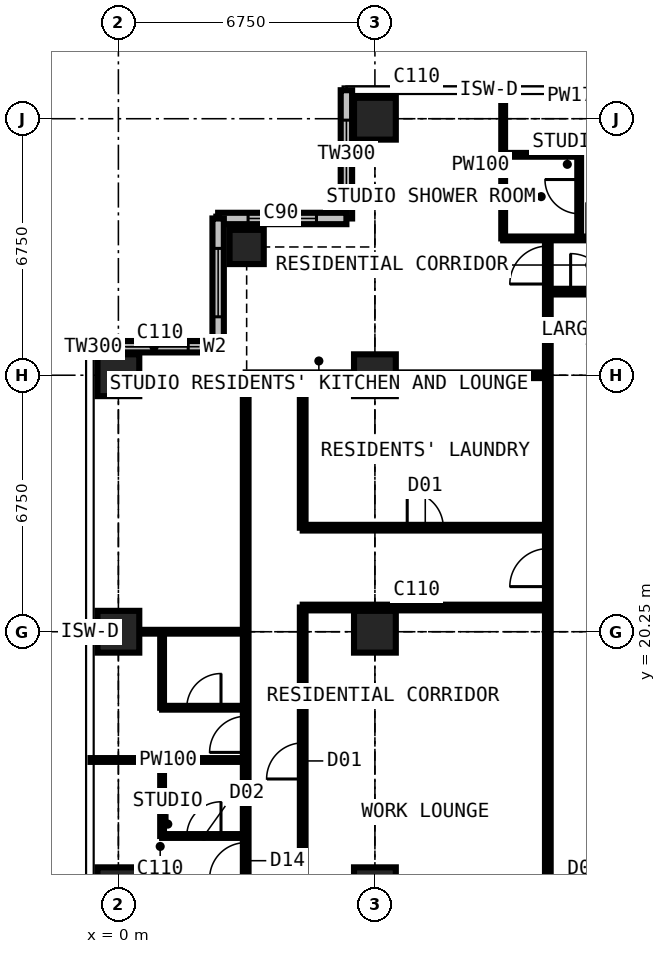
"""IFC4 building model, lengths in metres.
Left out: names, types, materials, properties, quantities, classifications, styles, units other than length and angle.
Written with IfcOpenShell. Run it as: python <this file> out.ifc"""

import sys

from ifc_helpers import new_model, si_unit, direction, frame, frame_2d, origin, origin_2d, place, context, subcontext, project, spatial, rectangle, extrude, element, fill, save


model = new_model("IFC4")
c1 = context("Model", 3, precision=1e-05, world=origin(), true_north=direction((0.0, 1.0)))
c2 = subcontext(c1, "Body", "Model", "MODEL_VIEW")
j1 = project(units=[si_unit("LENGTHUNIT", "METRE"), si_unit("PLANEANGLEUNIT", "RADIAN")], contexts=[c1])
p1 = place(None, origin())
s1 = spatial("IfcSite", under=j1, at=p1, CompositionType="ELEMENT")
p2 = place(p1, origin())
s2 = spatial("IfcBuilding", under=s1, at=p2, CompositionType="ELEMENT")
p3 = place(p2, frame((0.0, 0.0, 225.9)))
s3 = spatial("IfcBuildingStorey", under=s2, at=p3, CompositionType="ELEMENT", Elevation=225.9)
for number, where, z_axis, x_axis in (
    (1, (0.0, 13.5, 0.0), (0.0, 0.0, 1.0), (1.0, 0.0, 0.0)),
    (2, (0.0, 20.25, 0.0), (0.0, 0.0, 1.0), (1.0, 0.0, 0.0)),
    (3, (0.0, 27.0, 0.0), (0.0, 0.0, 1.0), (1.0, 0.0, 0.0)),
):
    element("IfcColumn", number, at=place(p3, frame(where, z_axis=z_axis, x_axis=x_axis)), inside=s3, PredefinedType="COLUMN", context=c2, shape_type="SweptSolid", body=[
        extrude(rectangle(XDim=1.1, YDim=1.1, at=origin_2d()), origin(), (0.0, 0.0, 1.0), 3.6),
    ])
p4 = place(p3, frame((3.375, 30.375, 0.0), z_axis=(0.0, 0.0, 1.0), x_axis=(1.0, 0.0, 0.0)))
e4 = element("IfcColumn", 4, at=p4, inside=s3, PredefinedType="COLUMN", context=c2, shape_type="SweptSolid", body=[
    extrude(rectangle(XDim=0.9, YDim=0.9, at=origin_2d()), origin(), (0.0, 0.0, 1.0), 3.6),
])
for number, where, z_axis, x_axis in (
    (5, (6.75, 13.5, 0.0), (0.0, 0.0, 1.0), (1.0, 0.0, 0.0)),
    (6, (6.75, 20.25, 0.0), (0.0, 0.0, 1.0), (1.0, 0.0, 0.0)),
    (7, (6.75, 27.0, 0.0), (0.0, 0.0, 1.0), (1.0, 0.0, 0.0)),
    (8, (6.75, 33.75, 0.0), (0.0, 0.0, 1.0), (1.0, 0.0, 0.0)),
):
    element("IfcColumn", number, at=place(p3, frame(where, z_axis=z_axis, x_axis=x_axis)), inside=s3, PredefinedType="COLUMN", context=c2, shape_type="SweptSolid", body=[
        extrude(rectangle(XDim=1.1, YDim=1.1, at=origin_2d()), origin(), (0.0, 0.0, 1.0), 3.6),
    ])
p5 = place(p3, frame((6.0, 34.5, 0.0), z_axis=(0.0, 0.0, 1.0), x_axis=(0.0, -1.0, 0.0)))
e9 = element("IfcWall", 9, at=p5, inside=s3, PredefinedType="SOLIDWALL", context=c2, shape_type="SweptSolid", body=[
    extrude(rectangle(XDim=3.375, YDim=0.3, at=frame_2d((1.688, 0.0))), origin(), (0.0, 0.0, 1.0), 3.375),
])
p6 = place(p5, frame((0.788, 0.0, 0.6)))
e10 = element("IfcOpeningElement", 10, at=p6, cuts=e9, PredefinedType="OPENING", context=c2, shape_type="SweptSolid", body=[
    extrude(rectangle(XDim=1.8, YDim=2.1, at=frame_2d((0.9, 1.05))), frame((0.0, 0.16, 0.0), z_axis=(0.0, -1.0, 0.0), x_axis=(1.0, 0.0, 0.0)), (0.0, 0.0, 1.0), 0.32),
])
p7 = place(p3, frame((6.0, 31.125, 0.0), z_axis=(0.0, 0.0, 1.0), x_axis=(-1.0, 0.0, 0.0)))
e11 = element("IfcWall", 11, at=p7, inside=s3, PredefinedType="SOLIDWALL", context=c2, shape_type="SweptSolid", body=[
    extrude(rectangle(XDim=3.375, YDim=0.3, at=frame_2d((1.688, 0.0))), origin(), (0.0, 0.0, 1.0), 3.375),
])
p8 = place(p7, frame((0.788, 0.0, 0.6)))
e12 = element("IfcOpeningElement", 12, at=p8, cuts=e11, PredefinedType="OPENING", context=c2, shape_type="SweptSolid", body=[
    extrude(rectangle(XDim=1.8, YDim=2.1, at=frame_2d((0.9, 1.05))), frame((0.0, 0.16, 0.0), z_axis=(0.0, -1.0, 0.0), x_axis=(1.0, 0.0, 0.0)), (0.0, 0.0, 1.0), 0.32),
])
p9 = place(p3, frame((2.625, 31.125, 0.0), z_axis=(0.0, 0.0, 1.0), x_axis=(0.0, -1.0, 0.0)))
e13 = element("IfcWall", 13, at=p9, inside=s3, PredefinedType="SOLIDWALL", context=c2, shape_type="SweptSolid", body=[
    extrude(rectangle(XDim=3.375, YDim=0.3, at=frame_2d((1.688, 0.0))), origin(), (0.0, 0.0, 1.0), 3.375),
])
p10 = place(p9, frame((0.788, 0.0, 0.6)))
e14 = element("IfcOpeningElement", 14, at=p10, cuts=e13, PredefinedType="OPENING", context=c2, shape_type="SweptSolid", body=[
    extrude(rectangle(XDim=1.8, YDim=2.1, at=frame_2d((0.9, 1.05))), frame((0.0, 0.16, 0.0), z_axis=(0.0, -1.0, 0.0), x_axis=(1.0, 0.0, 0.0)), (0.0, 0.0, 1.0), 0.32),
])
p11 = place(p3, frame((2.625, 27.75, 0.0), z_axis=(0.0, 0.0, 1.0), x_axis=(-1.0, 0.0, 0.0)))
e15 = element("IfcWall", 15, at=p11, inside=s3, PredefinedType="SOLIDWALL", context=c2, shape_type="SweptSolid", body=[
    extrude(rectangle(XDim=3.375, YDim=0.3, at=frame_2d((1.688, 0.0))), origin(), (0.0, 0.0, 1.0), 3.375),
])
p12 = place(p11, frame((0.788, 0.0, 0.6)))
e16 = element("IfcOpeningElement", 16, at=p12, cuts=e15, PredefinedType="OPENING", context=c2, shape_type="SweptSolid", body=[
    extrude(rectangle(XDim=1.8, YDim=2.1, at=frame_2d((0.9, 1.05))), frame((0.0, 0.16, 0.0), z_axis=(0.0, -1.0, 0.0), x_axis=(1.0, 0.0, 0.0)), (0.0, 0.0, 1.0), 0.32),
])
p13 = place(p3, frame((-0.734, 16.875, 0.0), z_axis=(0.0, 0.0, 1.0), x_axis=(1.0, 0.0, 0.0)))
e17 = element("IfcWall", 17, at=p13, inside=s3, PredefinedType="PARTITIONING", context=c2, shape_type="SweptSolid", body=[
    extrude(rectangle(XDim=4.084, YDim=0.1, at=frame_2d((2.042, 0.0))), origin(), (0.0, 0.0, 1.0), 3.375),
])
p14 = place(p3, frame((-0.734, 20.25, 0.0), z_axis=(0.0, 0.0, 1.0), x_axis=(1.0, 0.0, 0.0)))
e18 = element("IfcWall", 18, at=p14, inside=s3, PredefinedType="PARTITIONING", context=c2, shape_type="SweptSolid", body=[
    extrude(rectangle(XDim=4.084, YDim=0.1, at=frame_2d((2.042, 0.0))), origin(), (0.0, 0.0, 1.0), 2.877),
])
p15 = place(p3, frame((1.15, 14.875, 0.0), z_axis=(0.0, 0.0, 1.0), x_axis=(0.0, 1.0, 0.0)))
e19 = element("IfcWall", 19, at=p15, inside=s3, PredefinedType="PARTITIONING", context=c2, shape_type="SweptSolid", body=[
    extrude(rectangle(XDim=2.0, YDim=0.1, at=frame_2d((1.0, 0.0))), origin(), (0.0, 0.0, 1.0), 3.375),
])
p16 = place(p3, frame((1.15, 14.875, 0.0), z_axis=(0.0, 0.0, 1.0), x_axis=(1.0, 0.0, 0.0)))
e20 = element("IfcWall", 20, at=p16, inside=s3, PredefinedType="PARTITIONING", context=c2, shape_type="SweptSolid", body=[
    extrude(rectangle(XDim=2.2, YDim=0.1, at=frame_2d((1.1, 0.0))), origin(), (0.0, 0.0, 1.0), 3.375),
])
p17 = place(p16, frame((0.65, 0.0, 0.0)))
e21 = element("IfcOpeningElement", 21, at=p17, cuts=e20, PredefinedType="OPENING", context=c2, shape_type="SweptSolid", body=[
    extrude(rectangle(XDim=0.9, YDim=2.2, at=frame_2d((0.45, 1.1))), frame((0.0, 0.06, 0.0), z_axis=(0.0, -1.0, 0.0), x_axis=(1.0, 0.0, 0.0)), (0.0, 0.0, 1.0), 0.12),
])
p18 = place(p3, frame((1.15, 18.25, 0.0), z_axis=(0.0, 0.0, 1.0), x_axis=(0.0, 1.0, 0.0)))
e22 = element("IfcWall", 22, at=p18, inside=s3, PredefinedType="PARTITIONING", context=c2, shape_type="SweptSolid", body=[
    extrude(rectangle(XDim=2.0, YDim=0.1, at=frame_2d((1.0, 0.0))), origin(), (0.0, 0.0, 1.0), 3.375),
])
p19 = place(p3, frame((1.15, 18.25, 0.0), z_axis=(0.0, 0.0, 1.0), x_axis=(1.0, 0.0, 0.0)))
e23 = element("IfcWall", 23, at=p19, inside=s3, PredefinedType="PARTITIONING", context=c2, shape_type="SweptSolid", body=[
    extrude(rectangle(XDim=2.2, YDim=0.1, at=frame_2d((1.1, 0.0))), origin(), (0.0, 0.0, 1.0), 3.375),
])
p20 = place(p19, frame((0.65, 0.0, 0.0)))
e24 = element("IfcOpeningElement", 24, at=p20, cuts=e23, PredefinedType="OPENING", context=c2, shape_type="SweptSolid", body=[
    extrude(rectangle(XDim=0.9, YDim=2.2, at=frame_2d((0.45, 1.1))), frame((0.0, 0.06, 0.0), z_axis=(0.0, -1.0, 0.0), x_axis=(1.0, 0.0, 0.0)), (0.0, 0.0, 1.0), 0.12),
])
p21 = place(p3, frame((3.35, 13.5, 0.0), z_axis=(0.0, 0.0, 1.0), x_axis=(0.0, 1.0, 0.0)))
e25 = element("IfcWall", 25, at=p21, inside=s3, PredefinedType="PARTITIONING", context=c2, shape_type="SweptSolid", body=[
    extrude(rectangle(XDim=13.5, YDim=0.15, at=frame_2d((6.75, 0.0))), origin(), (0.0, 0.0, 1.0), 3.375),
])
p22 = place(p21, frame((0.25, 0.0, 0.0)))
e26 = element("IfcOpeningElement", 26, at=p22, cuts=e25, PredefinedType="OPENING", context=c2, shape_type="SweptSolid", body=[
    extrude(rectangle(XDim=0.95, YDim=2.2, at=frame_2d((0.475, 1.1))), frame((0.0, 0.085, 0.0), z_axis=(0.0, -1.0, 0.0), x_axis=(1.0, 0.0, 0.0)), (0.0, 0.0, 1.0), 0.17),
])
p23 = place(p21, frame((3.575, 0.0, 0.0)))
e27 = element("IfcOpeningElement", 27, at=p23, cuts=e25, PredefinedType="OPENING", context=c2, shape_type="SweptSolid", body=[
    extrude(rectangle(XDim=0.95, YDim=2.2, at=frame_2d((0.475, 1.1))), frame((0.0, 0.085, 0.0), z_axis=(0.0, -1.0, 0.0), x_axis=(1.0, 0.0, 0.0)), (0.0, 0.0, 1.0), 0.17),
])
p24 = place(p3, frame((3.35, 27.0, 0.0), z_axis=(0.0, 0.0, 1.0), x_axis=(1.0, 0.0, 0.0)))
e28 = element("IfcWall", 28, at=p24, inside=s3, PredefinedType="PARTITIONING", context=c2, shape_type="SweptSolid", body=[
    extrude(rectangle(XDim=7.95, YDim=0.15, at=frame_2d((3.975, 0.0))), origin(), (0.0, 0.0, 1.0), 2.877),
])
p25 = place(p3, frame((4.85, 12.775, 0.0), z_axis=(0.0, 0.0, 1.0), x_axis=(0.0, 1.0, 0.0)))
e29 = element("IfcWall", 29, at=p25, inside=s3, PredefinedType="PARTITIONING", context=c2, shape_type="SweptSolid", body=[
    extrude(rectangle(XDim=8.113, YDim=0.15, at=frame_2d((4.056, 0.0))), origin(), (0.0, 0.0, 1.0), 3.375),
])
p26 = place(p25, frame((3.6, 0.0, 0.0)))
e30 = element("IfcOpeningElement", 30, at=p26, cuts=e29, PredefinedType="OPENING", context=c2, shape_type="SweptSolid", body=[
    extrude(rectangle(XDim=0.95, YDim=2.2, at=frame_2d((0.475, 1.1))), frame((0.0, 0.085, 0.0), z_axis=(0.0, -1.0, 0.0), x_axis=(1.0, 0.0, 0.0)), (0.0, 0.0, 1.0), 0.17),
])
p27 = place(p3, frame((4.85, 20.887, 0.0), z_axis=(0.0, 0.0, 1.0), x_axis=(1.0, 0.0, 0.0)))
e31 = element("IfcWall", 31, at=p27, inside=s3, PredefinedType="PARTITIONING", context=c2, shape_type="SweptSolid", body=[
    extrude(rectangle(XDim=6.45, YDim=0.15, at=frame_2d((3.225, 0.0))), origin(), (0.0, 0.0, 1.0), 3.375),
])
p28 = place(p3, frame((4.85, 22.988, 0.0), z_axis=(0.0, 0.0, 1.0), x_axis=(0.0, 1.0, 0.0)))
e32 = element("IfcWall", 32, at=p28, inside=s3, PredefinedType="PARTITIONING", context=c2, shape_type="SweptSolid", body=[
    extrude(rectangle(XDim=4.012, YDim=0.15, at=frame_2d((2.006, 0.0))), origin(), (0.0, 0.0, 1.0), 3.375),
])
p29 = place(p3, frame((4.85, 22.988, 0.0), z_axis=(0.0, 0.0, 1.0), x_axis=(1.0, 0.0, 0.0)))
e33 = element("IfcWall", 33, at=p29, inside=s3, PredefinedType="PARTITIONING", context=c2, shape_type="SweptSolid", body=[
    extrude(rectangle(XDim=6.45, YDim=0.15, at=frame_2d((3.225, 0.0))), origin(), (0.0, 0.0, 1.0), 3.375),
])
p30 = place(p29, frame((2.75, 0.0, 0.0)))
e34 = element("IfcOpeningElement", 34, at=p30, cuts=e33, PredefinedType="OPENING", context=c2, shape_type="SweptSolid", body=[
    extrude(rectangle(XDim=0.95, YDim=2.2, at=frame_2d((0.475, 1.1))), frame((0.0, 0.085, 0.0), z_axis=(0.0, -1.0, 0.0), x_axis=(1.0, 0.0, 0.0)), (0.0, 0.0, 1.0), 0.17),
])
p31 = place(p3, frame((10.125, 30.6, 0.0), z_axis=(0.0, 0.0, 1.0), x_axis=(0.0, 1.0, 0.0)))
e35 = element("IfcWall", 35, at=p31, inside=s3, PredefinedType="PARTITIONING", context=c2, shape_type="SweptSolid", body=[
    extrude(rectangle(XDim=3.884, YDim=0.1, at=frame_2d((1.942, 0.0))), origin(), (0.0, 0.0, 1.0), 3.375),
])
p32 = place(p3, frame((10.125, 30.6, 0.0), z_axis=(0.0, 0.0, 1.0), x_axis=(1.0, 0.0, 0.0)))
e36 = element("IfcWall", 36, at=p32, inside=s3, PredefinedType="PARTITIONING", context=c2, shape_type="SweptSolid", body=[
    extrude(rectangle(XDim=3.375, YDim=0.1, at=frame_2d((1.688, 0.0))), origin(), (0.0, 0.0, 1.0), 3.375),
])
p33 = place(p32, frame((2.2, 0.0, 0.0)))
e37 = element("IfcOpeningElement", 37, at=p33, cuts=e36, PredefinedType="OPENING", context=c2, shape_type="SweptSolid", body=[
    extrude(rectangle(XDim=0.95, YDim=2.2, at=frame_2d((0.475, 1.1))), frame((0.0, 0.06, 0.0), z_axis=(0.0, -1.0, 0.0), x_axis=(1.0, 0.0, 0.0)), (0.0, 0.0, 1.0), 0.12),
])
p34 = place(p3, frame((10.125, 32.8, 0.0), z_axis=(0.0, 0.0, 1.0), x_axis=(1.0, 0.0, 0.0)))
e38 = element("IfcWall", 38, at=p34, inside=s3, PredefinedType="PARTITIONING", context=c2, shape_type="SweptSolid", body=[
    extrude(rectangle(XDim=2.0, YDim=0.1, at=frame_2d((1.0, 0.0))), origin(), (0.0, 0.0, 1.0), 3.375),
])
p35 = place(p3, frame((11.3, 11.3, 0.0), z_axis=(0.0, 0.0, 1.0), x_axis=(0.0, 1.0, 0.0)))
e39 = element("IfcWall", 39, at=p35, inside=s3, PredefinedType="PARTITIONING", context=c2, shape_type="SweptSolid", body=[
    extrude(rectangle(XDim=19.3, YDim=0.15, at=frame_2d((9.65, 0.0))), origin(), (0.0, 0.0, 1.0), 3.375),
])
p36 = place(p35, frame((18.1, 0.0, 0.0)))
e40 = element("IfcOpeningElement", 40, at=p36, cuts=e39, PredefinedType="OPENING", context=c2, shape_type="SweptSolid", body=[
    extrude(rectangle(XDim=1.0, YDim=2.2, at=frame_2d((0.5, 1.1))), frame((0.0, 0.085, 0.0), z_axis=(0.0, -1.0, 0.0), x_axis=(1.0, 0.0, 0.0)), (0.0, 0.0, 1.0), 0.17),
])
p37 = place(p35, frame((10.137, 0.0, 0.0)))
e41 = element("IfcOpeningElement", 41, at=p37, cuts=e39, PredefinedType="OPENING", context=c2, shape_type="SweptSolid", body=[
    extrude(rectangle(XDim=1.0, YDim=2.2, at=frame_2d((0.5, 1.1))), frame((0.0, 0.085, 0.0), z_axis=(0.0, -1.0, 0.0), x_axis=(1.0, 0.0, 0.0)), (0.0, 0.0, 1.0), 0.17),
])
p38 = place(p3, frame((11.3, 29.2, 0.0), z_axis=(0.0, 0.0, 1.0), x_axis=(1.0, 0.0, 0.0)))
e42 = element("IfcWall", 42, at=p38, inside=s3, PredefinedType="PARTITIONING", context=c2, shape_type="SweptSolid", body=[
    extrude(rectangle(XDim=19.809, YDim=0.15, at=frame_2d((9.904, 0.0))), origin(), (0.0, 0.0, 1.0), 3.375),
])
p39 = place(p38, frame((14.625, 0.0, 0.0)))
e43 = element("IfcOpeningElement", 43, at=p39, cuts=e42, PredefinedType="OPENING", context=c2, shape_type="SweptSolid", body=[
    extrude(rectangle(XDim=1.0, YDim=2.2, at=frame_2d((0.5, 1.1))), frame((0.0, 0.085, 0.0), z_axis=(0.0, -1.0, 0.0), x_axis=(1.0, 0.0, 0.0)), (0.0, 0.0, 1.0), 0.17),
])
p40 = place(p38, frame((6.4, 0.0, 0.0)))
e44 = element("IfcOpeningElement", 44, at=p40, cuts=e42, PredefinedType="OPENING", context=c2, shape_type="SweptSolid", body=[
    extrude(rectangle(XDim=0.95, YDim=2.2, at=frame_2d((0.475, 1.1))), frame((0.0, 0.085, 0.0), z_axis=(0.0, -1.0, 0.0), x_axis=(1.0, 0.0, 0.0)), (0.0, 0.0, 1.0), 0.17),
])
p41 = place(p38, frame((9.2, 0.0, 0.0)))
e45 = element("IfcOpeningElement", 45, at=p41, cuts=e42, PredefinedType="OPENING", context=c2, shape_type="SweptSolid", body=[
    extrude(rectangle(XDim=0.95, YDim=2.2, at=frame_2d((0.475, 1.1))), frame((0.0, 0.085, 0.0), z_axis=(0.0, -1.0, 0.0), x_axis=(1.0, 0.0, 0.0)), (0.0, 0.0, 1.0), 0.17),
])
p42 = place(p38, frame((0.6, 0.0, 0.0)))
e46 = element("IfcOpeningElement", 46, at=p42, cuts=e42, PredefinedType="OPENING", context=c2, shape_type="SweptSolid", body=[
    extrude(rectangle(XDim=1.0, YDim=2.2, at=frame_2d((0.5, 1.1))), frame((0.0, 0.085, 0.0), z_axis=(0.0, -1.0, 0.0), x_axis=(1.0, 0.0, 0.0)), (0.0, 0.0, 1.0), 0.17),
])
p43 = place(p3, frame((12.125, 30.6, 0.0), z_axis=(0.0, 0.0, 1.0), x_axis=(0.0, 1.0, 0.0)))
e47 = element("IfcWall", 47, at=p43, inside=s3, PredefinedType="PARTITIONING", context=c2, shape_type="SweptSolid", body=[
    extrude(rectangle(XDim=2.2, YDim=0.1, at=frame_2d((1.1, 0.0))), origin(), (0.0, 0.0, 1.0), 3.375),
])
p44 = place(p43, frame((0.65, 0.0, 0.0)))
e48 = element("IfcOpeningElement", 48, at=p44, cuts=e47, PredefinedType="OPENING", context=c2, shape_type="SweptSolid", body=[
    extrude(rectangle(XDim=0.9, YDim=2.2, at=frame_2d((0.45, 1.1))), frame((0.0, 0.06, 0.0), z_axis=(0.0, -1.0, 0.0), x_axis=(1.0, 0.0, 0.0)), (0.0, 0.0, 1.0), 0.12),
])
p45 = place(p6, origin())
e49 = element("IfcWindow", 49, at=p45, inside=s3, PartitioningType="SINGLE_PANEL", PredefinedType="WINDOW", context=c2, shape_type="SweptSolid", body=[
    extrude(rectangle(XDim=1.8, YDim=2.1, at=frame_2d((0.9, 1.05))), frame((0.0, 0.03, 0.0), z_axis=(0.0, -1.0, 0.0), x_axis=(1.0, 0.0, 0.0)), (0.0, 0.0, 1.0), 0.06),
])
fill(e10, e49)
p46 = place(p8, origin())
e50 = element("IfcWindow", 50, at=p46, inside=s3, PartitioningType="SINGLE_PANEL", PredefinedType="WINDOW", context=c2, shape_type="SweptSolid", body=[
    extrude(rectangle(XDim=1.8, YDim=2.1, at=frame_2d((0.9, 1.05))), frame((0.0, 0.03, 0.0), z_axis=(0.0, -1.0, 0.0), x_axis=(1.0, 0.0, 0.0)), (0.0, 0.0, 1.0), 0.06),
])
fill(e12, e50)
p47 = place(p10, origin())
e51 = element("IfcWindow", 51, at=p47, inside=s3, PartitioningType="SINGLE_PANEL", PredefinedType="WINDOW", context=c2, shape_type="SweptSolid", body=[
    extrude(rectangle(XDim=1.8, YDim=2.1, at=frame_2d((0.9, 1.05))), frame((0.0, 0.03, 0.0), z_axis=(0.0, -1.0, 0.0), x_axis=(1.0, 0.0, 0.0)), (0.0, 0.0, 1.0), 0.06),
])
fill(e14, e51)
p48 = place(p12, origin())
e52 = element("IfcWindow", 52, at=p48, inside=s3, PartitioningType="SINGLE_PANEL", PredefinedType="WINDOW", context=c2, shape_type="SweptSolid", body=[
    extrude(rectangle(XDim=1.8, YDim=2.1, at=frame_2d((0.9, 1.05))), frame((0.0, 0.03, 0.0), z_axis=(0.0, -1.0, 0.0), x_axis=(1.0, 0.0, 0.0)), (0.0, 0.0, 1.0), 0.06),
])
fill(e16, e52)
p49 = place(p44, origin())
e53 = element("IfcDoor", 53, at=p49, inside=s3, OperationType="SINGLE_SWING_RIGHT", PredefinedType="DOOR", context=c2, shape_type="SweptSolid", body=[
    extrude(rectangle(XDim=0.9, YDim=2.2, at=frame_2d((0.45, 1.1))), frame((0.0, 0.025, 0.0), z_axis=(0.0, -1.0, 0.0), x_axis=(1.0, 0.0, 0.0)), (0.0, 0.0, 1.0), 0.05),
])
fill(e48, e53)
p50 = place(p42, origin())
e54 = element("IfcDoor", 54, at=p50, inside=s3, OperationType="SINGLE_SWING_LEFT", PredefinedType="DOOR", context=c2, shape_type="SweptSolid", body=[
    extrude(rectangle(XDim=1.0, YDim=2.2, at=frame_2d((0.5, 1.1))), frame((0.0, 0.025, 0.0), z_axis=(0.0, -1.0, 0.0), x_axis=(1.0, 0.0, 0.0)), (0.0, 0.0, 1.0), 0.05),
])
fill(e46, e54)
p51 = place(p36, origin())
e55 = element("IfcDoor", 55, at=p51, inside=s3, OperationType="SINGLE_SWING_LEFT", PredefinedType="DOOR", context=c2, shape_type="SweptSolid", body=[
    extrude(rectangle(XDim=1.0, YDim=2.2, at=frame_2d((0.5, 1.1))), frame((0.0, 0.025, 0.0), z_axis=(0.0, -1.0, 0.0), x_axis=(1.0, 0.0, 0.0)), (0.0, 0.0, 1.0), 0.05),
])
fill(e40, e55)
p52 = place(p22, origin())
e56 = element("IfcDoor", 56, at=p52, inside=s3, OperationType="SINGLE_SWING_LEFT", PredefinedType="DOOR", context=c2, shape_type="SweptSolid", body=[
    extrude(rectangle(XDim=0.95, YDim=2.2, at=frame_2d((0.475, 1.1))), frame((0.0, 0.025, 0.0), z_axis=(0.0, -1.0, 0.0), x_axis=(1.0, 0.0, 0.0)), (0.0, 0.0, 1.0), 0.05),
])
fill(e26, e56)
p53 = place(p17, origin())
e57 = element("IfcDoor", 57, at=p53, inside=s3, OperationType="SINGLE_SWING_RIGHT", PredefinedType="DOOR", context=c2, shape_type="SweptSolid", body=[
    extrude(rectangle(XDim=0.9, YDim=2.2, at=frame_2d((0.45, 1.1))), frame((0.0, 0.025, 0.0), z_axis=(0.0, -1.0, 0.0), x_axis=(1.0, 0.0, 0.0)), (0.0, 0.0, 1.0), 0.05),
])
fill(e21, e57)
p54 = place(p23, origin())
e58 = element("IfcDoor", 58, at=p54, inside=s3, OperationType="SINGLE_SWING_LEFT", PredefinedType="DOOR", context=c2, shape_type="SweptSolid", body=[
    extrude(rectangle(XDim=0.95, YDim=2.2, at=frame_2d((0.475, 1.1))), frame((0.0, 0.025, 0.0), z_axis=(0.0, -1.0, 0.0), x_axis=(1.0, 0.0, 0.0)), (0.0, 0.0, 1.0), 0.05),
])
fill(e27, e58)
p55 = place(p20, origin())
e59 = element("IfcDoor", 59, at=p55, inside=s3, OperationType="SINGLE_SWING_RIGHT", PredefinedType="DOOR", context=c2, shape_type="SweptSolid", body=[
    extrude(rectangle(XDim=0.9, YDim=2.2, at=frame_2d((0.45, 1.1))), frame((0.0, 0.025, 0.0), z_axis=(0.0, -1.0, 0.0), x_axis=(1.0, 0.0, 0.0)), (0.0, 0.0, 1.0), 0.05),
])
fill(e24, e59)
p56 = place(p37, origin())
e60 = element("IfcDoor", 60, at=p56, inside=s3, OperationType="SINGLE_SWING_LEFT", PredefinedType="DOOR", context=c2, shape_type="SweptSolid", body=[
    extrude(rectangle(XDim=1.0, YDim=2.2, at=frame_2d((0.5, 1.1))), frame((0.0, 0.025, 0.0), z_axis=(0.0, -1.0, 0.0), x_axis=(1.0, 0.0, 0.0)), (0.0, 0.0, 1.0), 0.05),
])
fill(e41, e60)
p57 = place(p30, origin())
e61 = element("IfcDoor", 61, at=p57, inside=s3, OperationType="SINGLE_SWING_LEFT", PredefinedType="DOOR", context=c2, shape_type="SweptSolid", body=[
    extrude(rectangle(XDim=0.95, YDim=2.2, at=frame_2d((0.475, 1.1))), frame((0.0, 0.025, 0.0), z_axis=(0.0, -1.0, 0.0), x_axis=(1.0, 0.0, 0.0)), (0.0, 0.0, 1.0), 0.05),
])
fill(e34, e61)
p58 = place(p26, origin())
e62 = element("IfcDoor", 62, at=p58, inside=s3, OperationType="SINGLE_SWING_LEFT", PredefinedType="DOOR", context=c2, shape_type="SweptSolid", body=[
    extrude(rectangle(XDim=0.95, YDim=2.2, at=frame_2d((0.475, 1.1))), frame((0.0, 0.025, 0.0), z_axis=(0.0, -1.0, 0.0), x_axis=(1.0, 0.0, 0.0)), (0.0, 0.0, 1.0), 0.05),
])
fill(e30, e62)
save(model, sys.argv[1])
